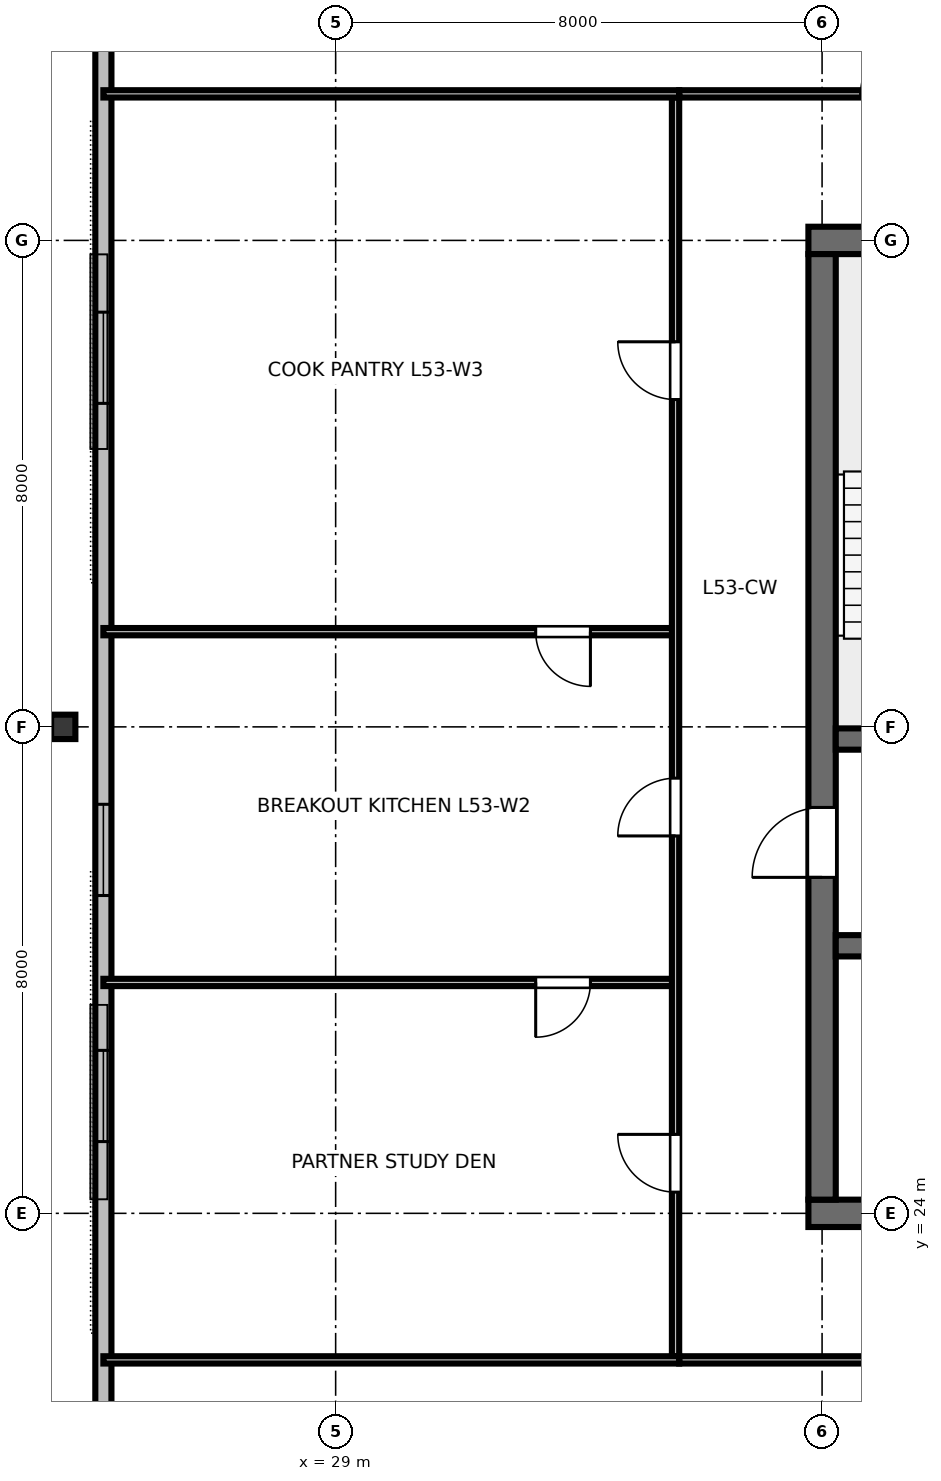
"""IFC4 building model, lengths in metres.
Left out: names, types, materials, properties, quantities, classifications, styles, units other than length and angle.
Written with IfcOpenShell. Run it as: python <this file> out.ifc"""

import sys

from ifc_helpers import new_model, si_unit, direction, frame, frame_2d, origin, origin_2d, place, context, subcontext, project, spatial, rectangle, i_section, extrude, element, fill, save


model = new_model("IFC4")
c1 = context("Model", 3, precision=1e-05, world=origin(), true_north=direction((0.0, 1.0)))
c2 = subcontext(c1, "Body", "Model", "MODEL_VIEW")
j1 = project(units=[si_unit("LENGTHUNIT", "METRE"), si_unit("PLANEANGLEUNIT", "RADIAN")], contexts=[c1])
p1 = place(None, origin())
s1 = spatial("IfcSite", under=j1, at=p1, CompositionType="ELEMENT")
p2 = place(p1, origin())
s2 = spatial("IfcBuilding", under=s1, at=p2, CompositionType="ELEMENT")
p3 = place(p2, frame((0.0, 0.0, 202.2)))
s3 = spatial("IfcBuildingStorey", under=s2, at=p3, CompositionType="ELEMENT", Elevation=202.2)
p4 = place(p3, frame((36.775, 24.0, 0.0), z_axis=(0.0, 0.0, 1.0), x_axis=(1.0, 0.0, 0.0)))
e1 = element("IfcWall", 1, at=p4, inside=s3, PredefinedType="SHEAR", context=c2, shape_type="SweptSolid", body=[
    extrude(rectangle(XDim=18.45, YDim=0.45, at=frame_2d((9.225, 0.0))), origin(), (0.0, 0.0, 1.0), 3.36),
])
p5 = place(p4, frame((13.425, 0.0, 0.0)))
e2 = element("IfcOpeningElement", 2, at=p5, cuts=e1, PredefinedType="OPENING", context=c2, shape_type="SweptSolid", body=[
    extrude(rectangle(XDim=1.6, YDim=2.15, at=frame_2d((0.8, 1.075))), frame((0.0, 0.235, 0.0), z_axis=(0.0, -1.0, 0.0), x_axis=(1.0, 0.0, 0.0)), (0.0, 0.0, 1.0), 0.47),
])
p6 = place(p3, frame((36.775, 40.0, 0.0), z_axis=(0.0, 0.0, 1.0), x_axis=(1.0, 0.0, 0.0)))
e3 = element("IfcWall", 3, at=p6, inside=s3, PredefinedType="SHEAR", context=c2, shape_type="SweptSolid", body=[
    extrude(rectangle(XDim=18.45, YDim=0.45, at=frame_2d((9.225, 0.0))), origin(), (0.0, 0.0, 1.0), 3.36),
])
p7 = place(p6, frame((10.525, 0.0, 0.0)))
e4 = element("IfcOpeningElement", 4, at=p7, cuts=e3, PredefinedType="OPENING", context=c2, shape_type="SweptSolid", body=[
    extrude(rectangle(XDim=1.0, YDim=2.15, at=frame_2d((0.5, 1.075))), frame((0.0, 0.235, 0.0), z_axis=(0.0, -1.0, 0.0), x_axis=(1.0, 0.0, 0.0)), (0.0, 0.0, 1.0), 0.47),
])
p8 = place(p3, frame((37.0, 24.225, 0.0), z_axis=(0.0, 0.0, 1.0), x_axis=(0.0, 1.0, 0.0)))
e5 = element("IfcWall", 5, at=p8, inside=s3, PredefinedType="SHEAR", context=c2, shape_type="SweptSolid", body=[
    extrude(rectangle(XDim=15.55, YDim=0.45, at=frame_2d((7.775, 0.0))), origin(), (0.0, 0.0, 1.0), 3.36),
])
p9 = place(p8, frame((5.3, 0.0, 0.0)))
e6 = element("IfcOpeningElement", 6, at=p9, cuts=e5, PredefinedType="OPENING", context=c2, shape_type="SweptSolid", body=[
    extrude(rectangle(XDim=1.15, YDim=2.15, at=frame_2d((0.575, 1.075))), frame((0.0, 0.235, 0.0), z_axis=(0.0, -1.0, 0.0), x_axis=(1.0, 0.0, 0.0)), (0.0, 0.0, 1.0), 0.47),
])
p10 = place(p3, frame((37.225, 31.8, 0.0), z_axis=(0.0, 0.0, 1.0), x_axis=(1.0, 0.0, 0.0)))
e7 = element("IfcWall", 7, at=p10, inside=s3, PredefinedType="SHEAR", context=c2, shape_type="SweptSolid", body=[
    extrude(rectangle(XDim=17.55, YDim=0.35, at=frame_2d((8.775, 0.0))), origin(), (0.0, 0.0, 1.0), 3.36),
])
p11 = place(p10, frame((0.825, 0.0, 0.0)))
e8 = element("IfcOpeningElement", 8, at=p11, cuts=e7, PredefinedType="OPENING", context=c2, shape_type="SweptSolid", body=[
    extrude(rectangle(XDim=1.1, YDim=2.15, at=frame_2d((0.55, 1.075))), frame((0.0, 0.185, 0.0), z_axis=(0.0, -1.0, 0.0), x_axis=(1.0, 0.0, 0.0)), (0.0, 0.0, 1.0), 0.37),
])
p12 = place(p10, frame((14.725, 0.0, 0.0)))
e9 = element("IfcOpeningElement", 9, at=p12, cuts=e7, PredefinedType="OPENING", context=c2, shape_type="SweptSolid", body=[
    extrude(rectangle(XDim=1.1, YDim=2.15, at=frame_2d((0.55, 1.075))), frame((0.0, 0.185, 0.0), z_axis=(0.0, -1.0, 0.0), x_axis=(1.0, 0.0, 0.0)), (0.0, 0.0, 1.0), 0.37),
])
p13 = place(p3, frame((37.225, 28.4, 0.0), z_axis=(0.0, 0.0, 1.0), x_axis=(1.0, 0.0, 0.0)))
e10 = element("IfcWall", 10, at=p13, inside=s3, PredefinedType="SHEAR", context=c2, shape_type="SweptSolid", body=[
    extrude(rectangle(XDim=17.55, YDim=0.35, at=frame_2d((8.775, 0.0))), origin(), (0.0, 0.0, 1.0), 3.36),
])
p14 = place(p3, frame((24.52, 32.0, 0.0), z_axis=(0.0, 0.0, 1.0), x_axis=(0.0, 1.0, 0.0)))
e11 = element("IfcColumn", 11, at=p14, inside=s3, PredefinedType="COLUMN", context=c2, shape_type="SweptSolid", body=[
    extrude(i_section(OverallWidth=0.401, OverallDepth=0.399, WebThickness=0.025, FlangeThickness=0.04, FilletRadius=0.025, at=origin_2d()), origin(), (0.0, 0.0, 1.0), 3.373),
])
p15 = place(p3, frame((25.18, 45.24, 0.0), z_axis=(0.0, 0.0, 1.0), x_axis=(0.0, -1.0, 0.0)))
e12 = element("IfcWall", 12, at=p15, inside=s3, PredefinedType="STANDARD", context=c2, shape_type="SweptSolid", body=[
    extrude(rectangle(XDim=26.48, YDim=0.265, at=frame_2d((13.24, 0.0))), origin(), (0.0, 0.0, 1.0), 3.375),
])
p16 = place(p15, frame((6.42, 0.0, 0.85)))
e13 = element("IfcOpeningElement", 13, at=p16, cuts=e12, PredefinedType="OPENING", context=c2, shape_type="SweptSolid", body=[
    extrude(rectangle(XDim=1.5, YDim=1.85, at=frame_2d((0.75, 0.925))), frame((0.0, 0.142, 0.0), z_axis=(0.0, -1.0, 0.0), x_axis=(1.0, 0.0, 0.0)), (0.0, 0.0, 1.0), 0.285),
])
p17 = place(p15, frame((14.513, 0.0, 0.85)))
e14 = element("IfcOpeningElement", 14, at=p17, cuts=e12, PredefinedType="OPENING", context=c2, shape_type="SweptSolid", body=[
    extrude(rectangle(XDim=1.5, YDim=1.85, at=frame_2d((0.75, 0.925))), frame((0.0, 0.142, 0.0), z_axis=(0.0, -1.0, 0.0), x_axis=(1.0, 0.0, 0.0)), (0.0, 0.0, 1.0), 0.285),
])
p18 = place(p15, frame((18.56, 0.0, 0.85)))
e15 = element("IfcOpeningElement", 15, at=p18, cuts=e12, PredefinedType="OPENING", context=c2, shape_type="SweptSolid", body=[
    extrude(rectangle(XDim=1.5, YDim=1.85, at=frame_2d((0.75, 0.925))), frame((0.0, 0.142, 0.0), z_axis=(0.0, -1.0, 0.0), x_axis=(1.0, 0.0, 0.0)), (0.0, 0.0, 1.0), 0.285),
])
p19 = place(p3, frame((34.65, 21.59, 0.0), z_axis=(0.0, 0.0, 1.0), x_axis=(1.0, 0.0, 0.0)))
e16 = element("IfcWall", 16, at=p19, inside=s3, PredefinedType="PARTITIONING", context=c2, shape_type="SweptSolid", body=[
    extrude(rectangle(XDim=10.33, YDim=0.12, at=frame_2d((5.165, 0.0))), origin(), (0.0, 0.0, 1.0), 2.655),
])
p20 = place(p19, frame((4.76, 0.0, 0.0)))
e17 = element("IfcOpeningElement", 17, at=p20, cuts=e16, PredefinedType="OPENING", context=c2, shape_type="SweptSolid", body=[
    extrude(rectangle(XDim=0.95, YDim=2.15, at=frame_2d((0.475, 1.075))), frame((0.0, 0.07, 0.0), z_axis=(0.0, -1.0, 0.0), x_axis=(1.0, 0.0, 0.0)), (0.0, 0.0, 1.0), 0.14),
])
p21 = place(p3, frame((34.65, 42.41, 0.0), z_axis=(0.0, 0.0, 1.0), x_axis=(1.0, 0.0, 0.0)))
e18 = element("IfcWall", 18, at=p21, inside=s3, PredefinedType="PARTITIONING", context=c2, shape_type="SweptSolid", body=[
    extrude(rectangle(XDim=10.33, YDim=0.12, at=frame_2d((5.165, 0.0))), origin(), (0.0, 0.0, 1.0), 2.655),
])
p22 = place(p21, frame((2.984, 0.0, 0.0)))
e19 = element("IfcOpeningElement", 19, at=p22, cuts=e18, PredefinedType="OPENING", context=c2, shape_type="SweptSolid", body=[
    extrude(rectangle(XDim=0.95, YDim=2.15, at=frame_2d((0.475, 1.075))), frame((0.0, 0.07, 0.0), z_axis=(0.0, -1.0, 0.0), x_axis=(1.0, 0.0, 0.0)), (0.0, 0.0, 1.0), 0.14),
])
p23 = place(p21, frame((8.079, 0.0, 0.0)))
e20 = element("IfcOpeningElement", 20, at=p23, cuts=e18, PredefinedType="OPENING", context=c2, shape_type="SweptSolid", body=[
    extrude(rectangle(XDim=0.95, YDim=2.15, at=frame_2d((0.475, 1.075))), frame((0.0, 0.07, 0.0), z_axis=(0.0, -1.0, 0.0), x_axis=(1.0, 0.0, 0.0)), (0.0, 0.0, 1.0), 0.14),
])
p24 = place(p3, frame((34.59, 27.797, 0.0), z_axis=(0.0, 0.0, 1.0), x_axis=(-1.0, 0.0, 0.0)))
e21 = element("IfcWall", 21, at=p24, inside=s3, PredefinedType="PARTITIONING", context=c2, shape_type="SweptSolid", body=[
    extrude(rectangle(XDim=9.41, YDim=0.12, at=frame_2d((4.705, 0.0))), origin(), (0.0, 0.0, 1.0), 2.655),
])
p25 = place(p24, frame((1.4, 0.0, 0.0)))
e22 = element("IfcOpeningElement", 22, at=p25, cuts=e21, PredefinedType="OPENING", context=c2, shape_type="SweptSolid", body=[
    extrude(rectangle(XDim=0.9, YDim=2.15, at=frame_2d((0.45, 1.075))), frame((0.0, 0.07, 0.0), z_axis=(0.0, -1.0, 0.0), x_axis=(1.0, 0.0, 0.0)), (0.0, 0.0, 1.0), 0.14),
])
p26 = place(p3, frame((34.59, 33.566, 0.0), z_axis=(0.0, 0.0, 1.0), x_axis=(-1.0, 0.0, 0.0)))
e23 = element("IfcWall", 23, at=p26, inside=s3, PredefinedType="PARTITIONING", context=c2, shape_type="SweptSolid", body=[
    extrude(rectangle(XDim=9.41, YDim=0.12, at=frame_2d((4.705, 0.0))), origin(), (0.0, 0.0, 1.0), 2.655),
])
p27 = place(p26, frame((1.4, 0.0, 0.0)))
e24 = element("IfcOpeningElement", 24, at=p27, cuts=e23, PredefinedType="OPENING", context=c2, shape_type="SweptSolid", body=[
    extrude(rectangle(XDim=0.9, YDim=2.15, at=frame_2d((0.45, 1.075))), frame((0.0, 0.07, 0.0), z_axis=(0.0, -1.0, 0.0), x_axis=(1.0, 0.0, 0.0)), (0.0, 0.0, 1.0), 0.14),
])
p28 = place(p3, frame((34.59, 21.65, 0.0), z_axis=(0.0, 0.0, 1.0), x_axis=(0.0, 1.0, 0.0)))
e25 = element("IfcWall", 25, at=p28, inside=s3, PredefinedType="PARTITIONING", context=c2, shape_type="SweptSolid", body=[
    extrude(rectangle(XDim=20.7, YDim=0.12, at=frame_2d((10.35, 0.0))), origin(), (0.0, 0.0, 1.0), 2.655),
])
p29 = place(p28, frame((2.698, 0.0, 0.0)))
e26 = element("IfcOpeningElement", 26, at=p29, cuts=e25, PredefinedType="OPENING", context=c2, shape_type="SweptSolid", body=[
    extrude(rectangle(XDim=0.95, YDim=2.15, at=frame_2d((0.475, 1.075))), frame((0.0, 0.07, 0.0), z_axis=(0.0, -1.0, 0.0), x_axis=(1.0, 0.0, 0.0)), (0.0, 0.0, 1.0), 0.14),
])
p30 = place(p28, frame((8.556, 0.0, 0.0)))
e27 = element("IfcOpeningElement", 27, at=p30, cuts=e25, PredefinedType="OPENING", context=c2, shape_type="SweptSolid", body=[
    extrude(rectangle(XDim=0.95, YDim=2.15, at=frame_2d((0.475, 1.075))), frame((0.0, 0.07, 0.0), z_axis=(0.0, -1.0, 0.0), x_axis=(1.0, 0.0, 0.0)), (0.0, 0.0, 1.0), 0.14),
])
p31 = place(p28, frame((15.733, 0.0, 0.0)))
e28 = element("IfcOpeningElement", 28, at=p31, cuts=e25, PredefinedType="OPENING", context=c2, shape_type="SweptSolid", body=[
    extrude(rectangle(XDim=0.95, YDim=2.15, at=frame_2d((0.475, 1.075))), frame((0.0, 0.07, 0.0), z_axis=(0.0, -1.0, 0.0), x_axis=(1.0, 0.0, 0.0)), (0.0, 0.0, 1.0), 0.14),
])
for number, where, z_axis, x_axis in (
    (29, (34.65, 21.59, 0.0), (0.0, 0.0, 1.0), (-1.0, 0.0, 0.0)),
    (30, (34.65, 42.41, 0.0), (0.0, 0.0, 1.0), (-1.0, 0.0, 0.0)),
):
    element("IfcWall", number, at=place(p3, frame(where, z_axis=z_axis, x_axis=x_axis)), inside=s3, PredefinedType="PARTITIONING", context=c2, shape_type="SweptSolid", body=[
        extrude(rectangle(XDim=9.47, YDim=0.12, at=frame_2d((4.735, 0.0))), origin(), (0.0, 0.0, 1.0), 2.655),
    ])
p32 = place(p16, origin())
e31 = element("IfcWindow", 31, at=p32, inside=s3, PartitioningType="SINGLE_PANEL", PredefinedType="WINDOW", context=c2, shape_type="SweptSolid", body=[
    extrude(rectangle(XDim=1.5, YDim=1.85, at=frame_2d((0.75, 0.925))), frame((0.0, 0.03, 0.0), z_axis=(0.0, -1.0, 0.0), x_axis=(1.0, 0.0, 0.0)), (0.0, 0.0, 1.0), 0.06),
])
fill(e13, e31)
p33 = place(p17, origin())
e32 = element("IfcWindow", 32, at=p33, inside=s3, PartitioningType="SINGLE_PANEL", PredefinedType="WINDOW", context=c2, shape_type="SweptSolid", body=[
    extrude(rectangle(XDim=1.5, YDim=1.85, at=frame_2d((0.75, 0.925))), frame((0.0, 0.03, 0.0), z_axis=(0.0, -1.0, 0.0), x_axis=(1.0, 0.0, 0.0)), (0.0, 0.0, 1.0), 0.06),
])
fill(e14, e32)
p34 = place(p18, origin())
e33 = element("IfcWindow", 33, at=p34, inside=s3, PartitioningType="SINGLE_PANEL", PredefinedType="WINDOW", context=c2, shape_type="SweptSolid", body=[
    extrude(rectangle(XDim=1.5, YDim=1.85, at=frame_2d((0.75, 0.925))), frame((0.0, 0.03, 0.0), z_axis=(0.0, -1.0, 0.0), x_axis=(1.0, 0.0, 0.0)), (0.0, 0.0, 1.0), 0.06),
])
fill(e15, e33)
p35 = place(p9, origin())
e34 = element("IfcDoor", 34, at=p35, inside=s3, OperationType="SINGLE_SWING_LEFT", PredefinedType="DOOR", context=c2, shape_type="SweptSolid", body=[
    extrude(rectangle(XDim=1.15, YDim=2.15, at=frame_2d((0.575, 1.075))), frame((0.0, 0.025, 0.0), z_axis=(0.0, -1.0, 0.0), x_axis=(1.0, 0.0, 0.0)), (0.0, 0.0, 1.0), 0.05),
])
fill(e6, e34)
p36 = place(p22, origin())
e35 = element("IfcDoor", 35, at=p36, inside=s3, OperationType="SINGLE_SWING_RIGHT", PredefinedType="DOOR", context=c2, shape_type="SweptSolid", body=[
    extrude(rectangle(XDim=0.95, YDim=2.15, at=frame_2d((0.475, 1.075))), frame((0.0, 0.025, 0.0), z_axis=(0.0, -1.0, 0.0), x_axis=(1.0, 0.0, 0.0)), (0.0, 0.0, 1.0), 0.05),
])
fill(e19, e35)
p37 = place(p25, origin())
e36 = element("IfcDoor", 36, at=p37, inside=s3, OperationType="SINGLE_SWING_RIGHT", PredefinedType="DOOR", context=c2, shape_type="SweptSolid", body=[
    extrude(rectangle(XDim=0.9, YDim=2.15, at=frame_2d((0.45, 1.075))), frame((0.0, 0.025, 0.0), z_axis=(0.0, -1.0, 0.0), x_axis=(1.0, 0.0, 0.0)), (0.0, 0.0, 1.0), 0.05),
])
fill(e22, e36)
p38 = place(p27, origin())
e37 = element("IfcDoor", 37, at=p38, inside=s3, OperationType="SINGLE_SWING_LEFT", PredefinedType="DOOR", context=c2, shape_type="SweptSolid", body=[
    extrude(rectangle(XDim=0.9, YDim=2.15, at=frame_2d((0.45, 1.075))), frame((0.0, 0.025, 0.0), z_axis=(0.0, -1.0, 0.0), x_axis=(1.0, 0.0, 0.0)), (0.0, 0.0, 1.0), 0.05),
])
fill(e24, e37)
p39 = place(p29, origin())
e38 = element("IfcDoor", 38, at=p39, inside=s3, OperationType="SINGLE_SWING_RIGHT", PredefinedType="DOOR", context=c2, shape_type="SweptSolid", body=[
    extrude(rectangle(XDim=0.95, YDim=2.15, at=frame_2d((0.475, 1.075))), frame((0.0, 0.025, 0.0), z_axis=(0.0, -1.0, 0.0), x_axis=(1.0, 0.0, 0.0)), (0.0, 0.0, 1.0), 0.05),
])
fill(e26, e38)
p40 = place(p30, origin())
e39 = element("IfcDoor", 39, at=p40, inside=s3, OperationType="SINGLE_SWING_LEFT", PredefinedType="DOOR", context=c2, shape_type="SweptSolid", body=[
    extrude(rectangle(XDim=0.95, YDim=2.15, at=frame_2d((0.475, 1.075))), frame((0.0, 0.025, 0.0), z_axis=(0.0, -1.0, 0.0), x_axis=(1.0, 0.0, 0.0)), (0.0, 0.0, 1.0), 0.05),
])
fill(e27, e39)
p41 = place(p31, origin())
e40 = element("IfcDoor", 40, at=p41, inside=s3, OperationType="SINGLE_SWING_RIGHT", PredefinedType="DOOR", context=c2, shape_type="SweptSolid", body=[
    extrude(rectangle(XDim=0.95, YDim=2.15, at=frame_2d((0.475, 1.075))), frame((0.0, 0.025, 0.0), z_axis=(0.0, -1.0, 0.0), x_axis=(1.0, 0.0, 0.0)), (0.0, 0.0, 1.0), 0.05),
])
fill(e28, e40)
save(model, sys.argv[1])
